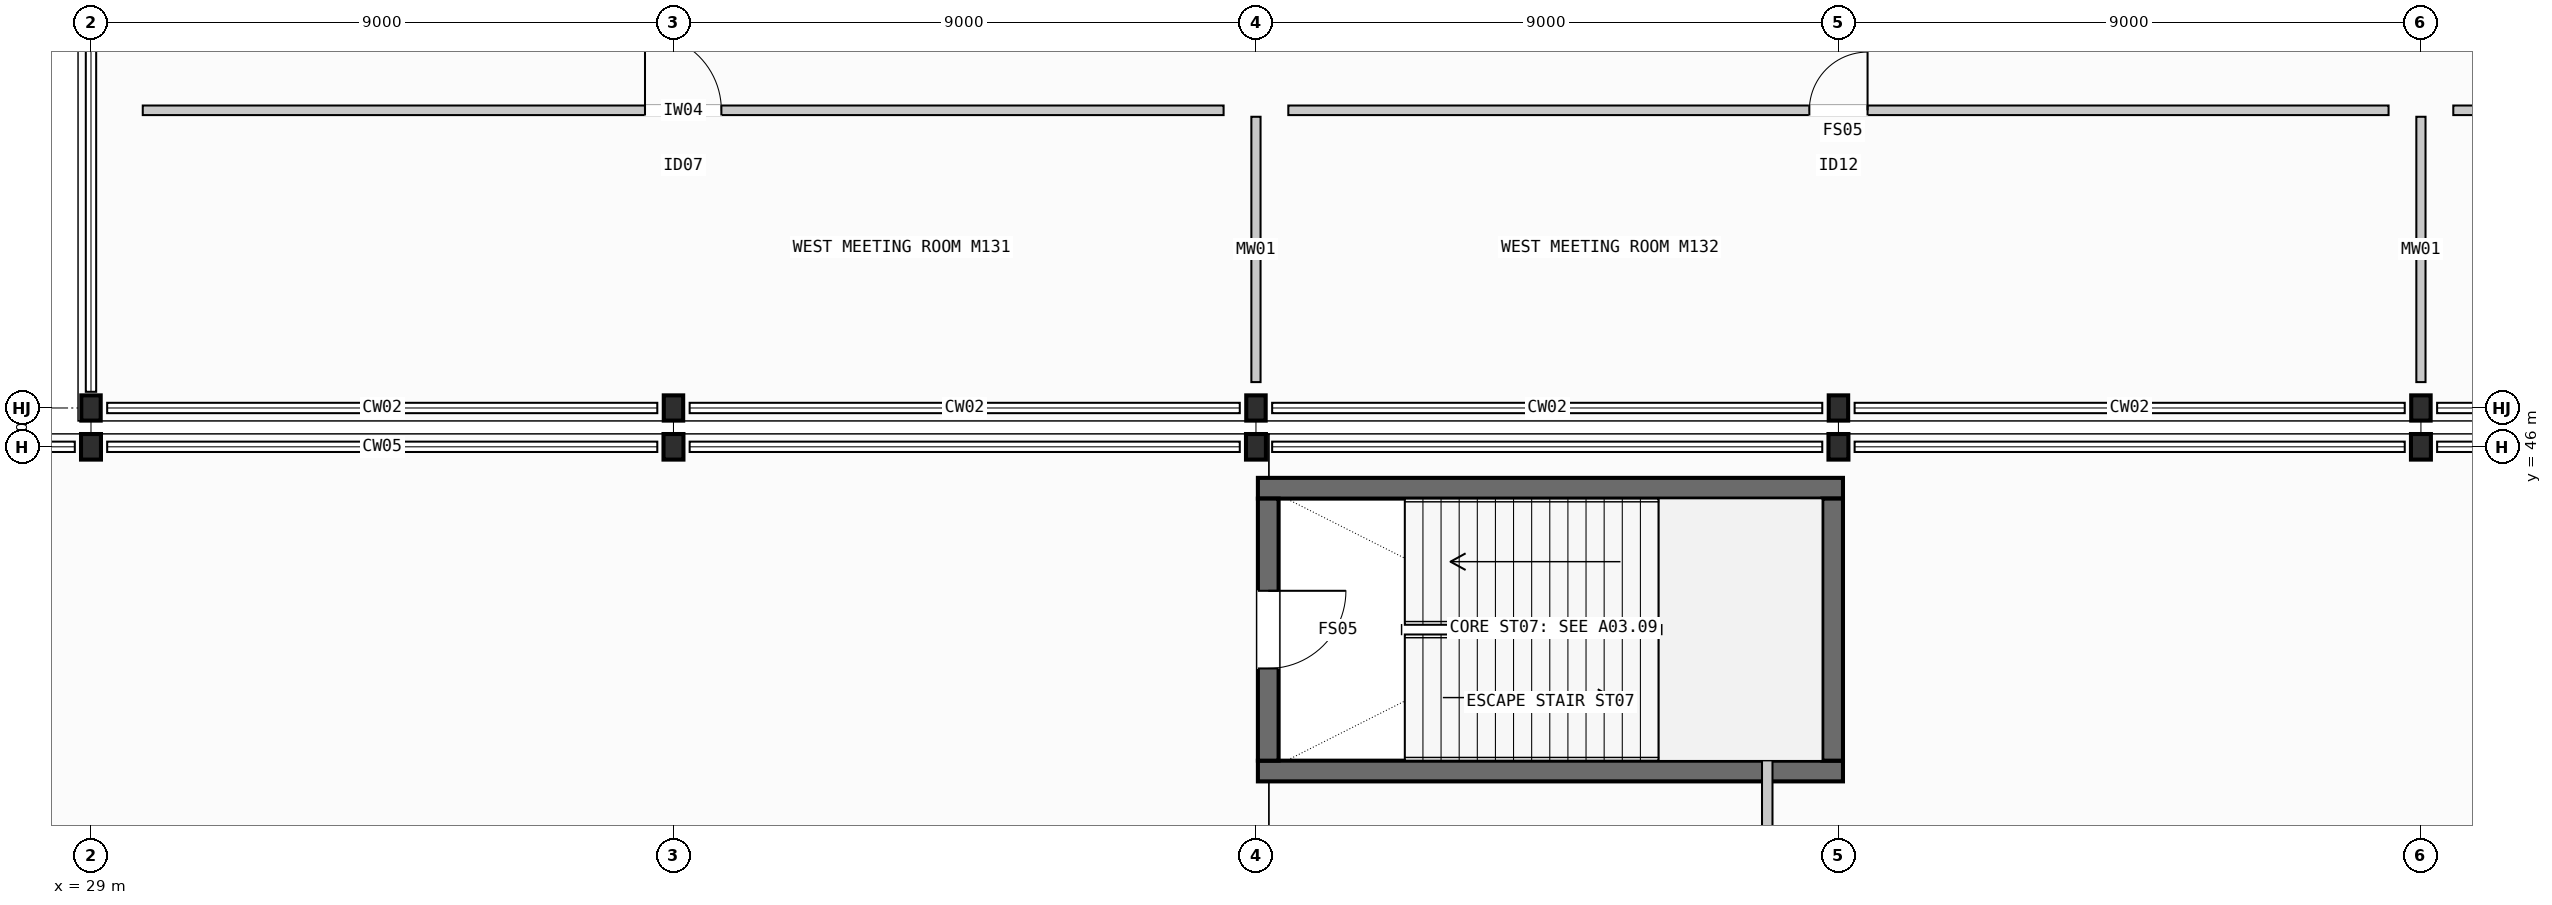
"""IFC4 building model, lengths in metres.
Left out: names, types, materials, properties, quantities, classifications, styles, units other than length and angle.
Written with IfcOpenShell. Run it as: python <this file> out.ifc"""

import sys

from ifc_helpers import new_model, si_unit, direction, frame, frame_2d, origin, origin_2d, place, context, subcontext, project, spatial, rectangle, i_section, extrude, element, fill, save


model = new_model("IFC4")
c1 = context("Model", 3, precision=1e-05, world=origin(), true_north=direction((0.0, 1.0)))
c2 = subcontext(c1, "Body", "Model", "MODEL_VIEW")
j1 = project(units=[si_unit("LENGTHUNIT", "METRE"), si_unit("PLANEANGLEUNIT", "RADIAN")], contexts=[c1])
p1 = place(None, origin())
s1 = spatial("IfcSite", under=j1, at=p1, CompositionType="ELEMENT")
p2 = place(p1, origin())
s2 = spatial("IfcBuilding", under=s1, at=p2, CompositionType="ELEMENT")
p3 = place(p2, frame((0.0, 0.0, 6.0)))
s3 = spatial("IfcBuildingStorey", under=s2, at=p3, CompositionType="ELEMENT", Elevation=6.0)
p4 = place(p3, frame((29.0, 46.0, 0.0), z_axis=(0.0, 0.0, 1.0), x_axis=(1.0, 0.0, 0.0)))
e1 = element("IfcColumn", 1, at=p4, inside=s3, PredefinedType="COLUMN", context=c2, shape_type="SweptSolid", body=[
    extrude(i_section(OverallWidth=0.308, OverallDepth=0.395, WebThickness=0.021, FlangeThickness=0.04, FilletRadius=0.027, at=origin_2d()), origin(), (0.0, 0.0, 1.0), 5.4),
])
p5 = place(p3, frame((29.0, 46.6, 0.0), z_axis=(0.0, 0.0, 1.0), x_axis=(1.0, 0.0, 0.0)))
e2 = element("IfcColumn", 2, at=p5, inside=s3, PredefinedType="COLUMN", context=c2, shape_type="SweptSolid", body=[
    extrude(i_section(OverallWidth=0.3, OverallDepth=0.39, WebThickness=0.011, FlangeThickness=0.019, FilletRadius=0.027, at=origin_2d()), origin(), (0.0, 0.0, 1.0), 5.4),
])
p6 = place(p3, frame((38.0, 46.0, 0.0), z_axis=(0.0, 0.0, 1.0), x_axis=(1.0, 0.0, 0.0)))
e3 = element("IfcColumn", 3, at=p6, inside=s3, PredefinedType="COLUMN", context=c2, shape_type="SweptSolid", body=[
    extrude(i_section(OverallWidth=0.308, OverallDepth=0.395, WebThickness=0.021, FlangeThickness=0.04, FilletRadius=0.027, at=origin_2d()), origin(), (0.0, 0.0, 1.0), 5.4),
])
p7 = place(p3, frame((38.0, 46.6, 0.0), z_axis=(0.0, 0.0, 1.0), x_axis=(1.0, 0.0, 0.0)))
e4 = element("IfcColumn", 4, at=p7, inside=s3, PredefinedType="COLUMN", context=c2, shape_type="SweptSolid", body=[
    extrude(i_section(OverallWidth=0.3, OverallDepth=0.39, WebThickness=0.011, FlangeThickness=0.019, FilletRadius=0.027, at=origin_2d()), origin(), (0.0, 0.0, 1.0), 5.4),
])
p8 = place(p3, frame((47.0, 46.0, 0.0), z_axis=(0.0, 0.0, 1.0), x_axis=(1.0, 0.0, 0.0)))
e5 = element("IfcColumn", 5, at=p8, inside=s3, PredefinedType="COLUMN", context=c2, shape_type="SweptSolid", body=[
    extrude(i_section(OverallWidth=0.308, OverallDepth=0.395, WebThickness=0.021, FlangeThickness=0.04, FilletRadius=0.027, at=origin_2d()), origin(), (0.0, 0.0, 1.0), 5.4),
])
p9 = place(p3, frame((47.0, 46.6, 0.0), z_axis=(0.0, 0.0, 1.0), x_axis=(1.0, 0.0, 0.0)))
e6 = element("IfcColumn", 6, at=p9, inside=s3, PredefinedType="COLUMN", context=c2, shape_type="SweptSolid", body=[
    extrude(i_section(OverallWidth=0.3, OverallDepth=0.39, WebThickness=0.011, FlangeThickness=0.019, FilletRadius=0.027, at=origin_2d()), origin(), (0.0, 0.0, 1.0), 5.4),
])
p10 = place(p3, frame((56.0, 46.0, 0.0), z_axis=(0.0, 0.0, 1.0), x_axis=(1.0, 0.0, 0.0)))
e7 = element("IfcColumn", 7, at=p10, inside=s3, PredefinedType="COLUMN", context=c2, shape_type="SweptSolid", body=[
    extrude(i_section(OverallWidth=0.308, OverallDepth=0.395, WebThickness=0.021, FlangeThickness=0.04, FilletRadius=0.027, at=origin_2d()), origin(), (0.0, 0.0, 1.0), 5.4),
])
p11 = place(p3, frame((56.0, 46.6, 0.0), z_axis=(0.0, 0.0, 1.0), x_axis=(1.0, 0.0, 0.0)))
e8 = element("IfcColumn", 8, at=p11, inside=s3, PredefinedType="COLUMN", context=c2, shape_type="SweptSolid", body=[
    extrude(i_section(OverallWidth=0.3, OverallDepth=0.39, WebThickness=0.011, FlangeThickness=0.019, FilletRadius=0.027, at=origin_2d()), origin(), (0.0, 0.0, 1.0), 5.4),
])
p12 = place(p3, frame((65.0, 46.0, 0.0), z_axis=(0.0, 0.0, 1.0), x_axis=(1.0, 0.0, 0.0)))
e9 = element("IfcColumn", 9, at=p12, inside=s3, PredefinedType="COLUMN", context=c2, shape_type="SweptSolid", body=[
    extrude(i_section(OverallWidth=0.308, OverallDepth=0.395, WebThickness=0.021, FlangeThickness=0.04, FilletRadius=0.027, at=origin_2d()), origin(), (0.0, 0.0, 1.0), 5.4),
])
p13 = place(p3, frame((65.0, 46.6, 0.0), z_axis=(0.0, 0.0, 1.0), x_axis=(1.0, 0.0, 0.0)))
e10 = element("IfcColumn", 10, at=p13, inside=s3, PredefinedType="COLUMN", context=c2, shape_type="SweptSolid", body=[
    extrude(i_section(OverallWidth=0.3, OverallDepth=0.39, WebThickness=0.011, FlangeThickness=0.019, FilletRadius=0.027, at=origin_2d()), origin(), (0.0, 0.0, 1.0), 5.4),
])
for number, where, z_axis, x_axis in (
    (11, (47.03, 40.99, 0.0), (0.0, 0.0, 1.0), (1.0, 0.0, 0.0)),
    (12, (47.03, 45.36, 0.0), (0.0, 0.0, 1.0), (1.0, 0.0, 0.0)),
):
    element("IfcWall", number, at=place(p3, frame(where, z_axis=z_axis, x_axis=x_axis)), inside=s3, PredefinedType="SHEAR", context=c2, shape_type="SweptSolid", body=[
        extrude(rectangle(XDim=9.04, YDim=0.32, at=frame_2d((4.52, 0.0))), origin(), (0.0, 0.0, 1.0), 5.4),
    ])
p14 = place(p3, frame((47.19, 41.15, 0.0), z_axis=(0.0, 0.0, 1.0), x_axis=(0.0, 1.0, 0.0)))
e13 = element("IfcWall", 13, at=p14, inside=s3, PredefinedType="SHEAR", context=c2, shape_type="SweptSolid", body=[
    extrude(rectangle(XDim=4.05, YDim=0.32, at=frame_2d((2.025, 0.0))), origin(), (0.0, 0.0, 1.0), 5.4),
])
p15 = place(p14, frame((1.425, 0.0, 0.0)))
e14 = element("IfcOpeningElement", 14, at=p15, cuts=e13, PredefinedType="OPENING", context=c2, shape_type="SweptSolid", body=[
    extrude(rectangle(XDim=1.2, YDim=2.2, at=frame_2d((0.6, 1.1))), frame((0.0, 0.17, 0.0), z_axis=(0.0, -1.0, 0.0), x_axis=(1.0, 0.0, 0.0)), (0.0, 0.0, 1.0), 0.34),
])
p16 = place(p3, frame((55.91, 41.15, 0.0), z_axis=(0.0, 0.0, 1.0), x_axis=(0.0, 1.0, 0.0)))
e15 = element("IfcWall", 15, at=p16, inside=s3, PredefinedType="SHEAR", context=c2, shape_type="SweptSolid", body=[
    extrude(rectangle(XDim=4.05, YDim=0.32, at=frame_2d((2.025, 0.0))), origin(), (0.0, 0.0, 1.0), 5.4),
])
p17 = place(p3, frame((54.9, 36.0, 0.0), z_axis=(0.0, 0.0, 1.0), x_axis=(0.0, 1.0, 0.0)))
e16 = element("IfcWall", 16, at=p17, inside=s3, PredefinedType="PARTITIONING", context=c2, shape_type="SweptSolid", body=[
    extrude(rectangle(XDim=8.8, YDim=0.162, at=frame_2d((4.4, 0.0))), origin(), (0.0, 0.0, 1.0), 4.4),
])
p18 = place(p17, frame((2.59, 0.0, 0.0)))
e17 = element("IfcOpeningElement", 17, at=p18, cuts=e16, PredefinedType="OPENING", context=c2, shape_type="SweptSolid", body=[
    extrude(rectangle(XDim=1.12, YDim=2.22, at=frame_2d((0.56, 1.11))), frame((0.0, 0.091, 0.0), z_axis=(0.0, -1.0, 0.0), x_axis=(1.0, 0.0, 0.0)), (0.0, 0.0, 1.0), 0.182),
])
p19 = place(p3, frame((29.8, 51.2, 0.0), z_axis=(0.0, 0.0, 1.0), x_axis=(1.0, 0.0, 0.0)))
e18 = element("IfcWall", 18, at=p19, inside=s3, PredefinedType="PARTITIONING", context=c2, shape_type="SweptSolid", body=[
    extrude(rectangle(XDim=16.7, YDim=0.148, at=frame_2d((8.35, 0.0))), origin(), (0.0, 0.0, 1.0), 4.4),
])
p20 = place(p19, frame((7.76, 0.0, 0.0)))
e19 = element("IfcOpeningElement", 19, at=p20, cuts=e18, PredefinedType="OPENING", context=c2, shape_type="SweptSolid", body=[
    extrude(rectangle(XDim=1.18, YDim=2.25, at=frame_2d((0.59, 1.125))), frame((0.0, 0.084, 0.0), z_axis=(0.0, -1.0, 0.0), x_axis=(1.0, 0.0, 0.0)), (0.0, 0.0, 1.0), 0.168),
])
p21 = place(p3, frame((47.5, 51.2, 0.0), z_axis=(0.0, 0.0, 1.0), x_axis=(1.0, 0.0, 0.0)))
e20 = element("IfcWall", 20, at=p21, inside=s3, PredefinedType="PARTITIONING", context=c2, shape_type="SweptSolid", body=[
    extrude(rectangle(XDim=17.0, YDim=0.148, at=frame_2d((8.5, 0.0))), origin(), (0.0, 0.0, 1.0), 4.4),
])
p22 = place(p21, frame((8.05, 0.0, 0.0)))
e21 = element("IfcOpeningElement", 21, at=p22, cuts=e20, PredefinedType="OPENING", context=c2, shape_type="SweptSolid", body=[
    extrude(rectangle(XDim=0.9, YDim=2.08, at=frame_2d((0.45, 1.04))), frame((0.0, 0.084, 0.0), z_axis=(0.0, -1.0, 0.0), x_axis=(1.0, 0.0, 0.0)), (0.0, 0.0, 1.0), 0.168),
])
p23 = place(p3, frame((65.5, 51.2, 0.0), z_axis=(0.0, 0.0, 1.0), x_axis=(1.0, 0.0, 0.0)))
e22 = element("IfcWall", 22, at=p23, inside=s3, PredefinedType="PARTITIONING", context=c2, shape_type="SweptSolid", body=[
    extrude(rectangle(XDim=16.7, YDim=0.148, at=frame_2d((8.35, 0.0))), origin(), (0.0, 0.0, 1.0), 4.4),
])
p24 = place(p23, frame((7.86, 0.0, 0.0)))
e23 = element("IfcOpeningElement", 23, at=p24, cuts=e22, PredefinedType="OPENING", context=c2, shape_type="SweptSolid", body=[
    extrude(rectangle(XDim=0.98, YDim=2.14, at=frame_2d((0.49, 1.07))), frame((0.0, 0.084, 0.0), z_axis=(0.0, -1.0, 0.0), x_axis=(1.0, 0.0, 0.0)), (0.0, 0.0, 1.0), 0.168),
])
for number, where, z_axis, x_axis in (
    (24, (47.0, 47.0, 0.0), (0.0, 0.0, 1.0), (0.0, 1.0, 0.0)),
    (25, (65.0, 47.0, 0.0), (0.0, 0.0, 1.0), (0.0, 1.0, 0.0)),
):
    element("IfcWall", number, at=place(p3, frame(where, z_axis=z_axis, x_axis=x_axis)), inside=s3, PredefinedType="MOVABLE", context=c2, shape_type="SweptSolid", body=[
        extrude(rectangle(XDim=4.1, YDim=0.142, at=frame_2d((2.05, 0.0))), origin(), (0.0, 0.0, 1.0), 4.4),
    ])
p25 = place(p15, frame((1.2, 0.0, 0.0), z_axis=(0.0, 0.0, 1.0), x_axis=(-1.0, 0.0, 0.0)))
e26 = element("IfcDoor", 26, at=p25, inside=s3, OperationType="SINGLE_SWING_LEFT", PredefinedType="DOOR", context=c2, shape_type="SweptSolid", body=[
    extrude(rectangle(XDim=1.2, YDim=2.2, at=frame_2d((0.6, 1.1))), frame((0.0, 0.025, 0.0), z_axis=(0.0, -1.0, 0.0), x_axis=(1.0, 0.0, 0.0)), (0.0, 0.0, 1.0), 0.05),
])
fill(e14, e26)
p26 = place(p20, origin())
e27 = element("IfcDoor", 27, at=p26, inside=s3, OperationType="SINGLE_SWING_LEFT", PredefinedType="DOOR", context=c2, shape_type="SweptSolid", body=[
    extrude(rectangle(XDim=1.18, YDim=2.25, at=frame_2d((0.59, 1.125))), frame((0.0, 0.025, 0.0), z_axis=(0.0, -1.0, 0.0), x_axis=(1.0, 0.0, 0.0)), (0.0, 0.0, 1.0), 0.05),
])
fill(e19, e27)
p27 = place(p22, origin())
e28 = element("IfcDoor", 28, at=p27, inside=s3, OperationType="SINGLE_SWING_RIGHT", PredefinedType="DOOR", context=c2, shape_type="SweptSolid", body=[
    extrude(rectangle(XDim=0.9, YDim=2.08, at=frame_2d((0.45, 1.04))), frame((0.0, 0.025, 0.0), z_axis=(0.0, -1.0, 0.0), x_axis=(1.0, 0.0, 0.0)), (0.0, 0.0, 1.0), 0.05),
])
fill(e21, e28)
save(model, sys.argv[1])
